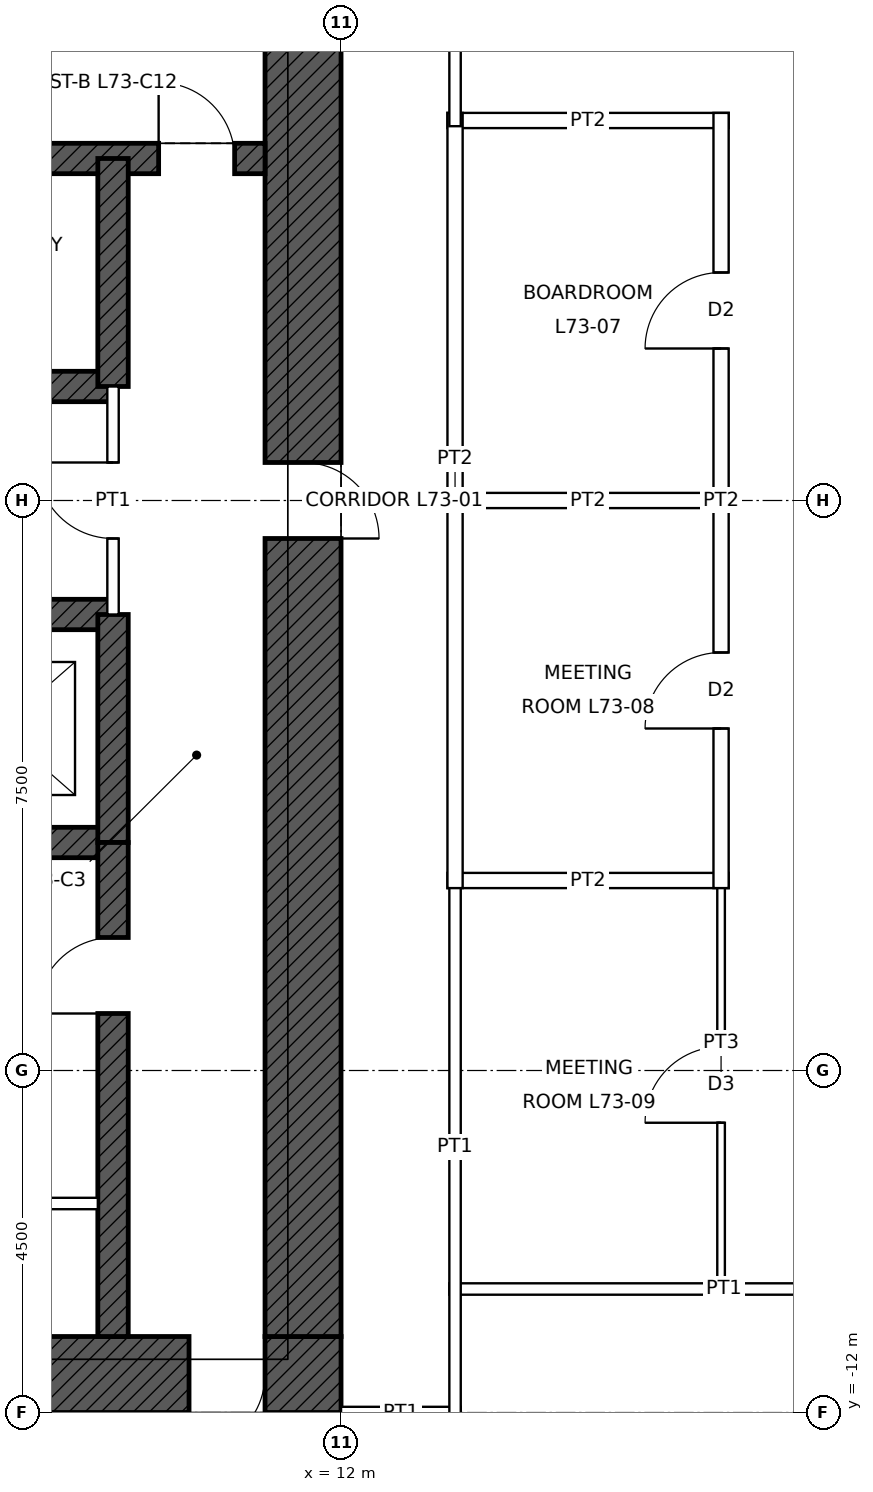
"""IFC4 building model, lengths in metres.
Left out: names, types, materials, properties, quantities, classifications, styles, units other than length and angle.
Written with IfcOpenShell. Run it as: python <this file> out.ifc"""

import sys

from ifc_helpers import new_model, si_unit, direction, frame, frame_2d, origin, place, context, subcontext, project, spatial, rectangle, extrude, element, fill, save


model = new_model("IFC4")
c1 = context("Model", 3, precision=1e-05, world=origin(), true_north=direction((0.0, 1.0)))
c2 = subcontext(c1, "Body", "Model", "MODEL_VIEW")
j1 = project(units=[si_unit("LENGTHUNIT", "METRE"), si_unit("PLANEANGLEUNIT", "RADIAN")], contexts=[c1])
p1 = place(None, origin())
s1 = spatial("IfcSite", under=j1, at=p1, CompositionType="ELEMENT")
p2 = place(p1, origin())
s2 = spatial("IfcBuilding", under=s1, at=p2, CompositionType="ELEMENT")
p3 = place(p2, frame((0.0, 0.0, 327.9)))
s3 = spatial("IfcBuildingStorey", under=s2, at=p3, CompositionType="ELEMENT", Elevation=327.9)
p4 = place(p3, frame((12.0, -11.5, 0.0), z_axis=(0.0, 0.0, 1.0), x_axis=(-1.0, 0.0, 0.0)))
e1 = element("IfcWall", 1, at=p4, inside=s3, PredefinedType="SHEAR", context=c2, shape_type="SweptSolid", body=[
    extrude(rectangle(XDim=24.0, YDim=1.0, at=frame_2d((12.0, 0.0))), origin(), (0.0, 0.0, 1.0), 4.0),
])
p5 = place(p4, frame((11.5, 0.0, 0.0)))
e2 = element("IfcOpeningElement", 2, at=p5, cuts=e1, PredefinedType="OPENING", context=c2, shape_type="SweptSolid", body=[
    extrude(rectangle(XDim=1.0, YDim=2.1, at=frame_2d((0.5, 1.05))), frame((0.0, 0.51, 0.0), z_axis=(0.0, -1.0, 0.0), x_axis=(1.0, 0.0, 0.0)), (0.0, 0.0, 1.0), 1.02),
])
p6 = place(p4, frame((1.0, 0.0, 0.0)))
e3 = element("IfcOpeningElement", 3, at=p6, cuts=e1, PredefinedType="OPENING", context=c2, shape_type="SweptSolid", body=[
    extrude(rectangle(XDim=1.0, YDim=2.4, at=frame_2d((0.5, 1.2))), frame((0.0, 0.51, 0.0), z_axis=(0.0, -1.0, 0.0), x_axis=(1.0, 0.0, 0.0)), (0.0, 0.0, 1.0), 1.02),
])
p7 = place(p3, frame((11.5, 11.0, 0.0), z_axis=(0.0, 0.0, 1.0), x_axis=(0.0, -1.0, 0.0)))
e4 = element("IfcWall", 4, at=p7, inside=s3, PredefinedType="SHEAR", context=c2, shape_type="SweptSolid", body=[
    extrude(rectangle(XDim=22.0, YDim=1.0, at=frame_2d((11.0, 0.0))), origin(), (0.0, 0.0, 1.0), 4.0),
])
p8 = place(p7, frame((10.5, 0.0, 0.0)))
e5 = element("IfcOpeningElement", 5, at=p8, cuts=e4, PredefinedType="OPENING", context=c2, shape_type="SweptSolid", body=[
    extrude(rectangle(XDim=1.0, YDim=2.4, at=frame_2d((0.5, 1.2))), frame((0.0, 0.51, 0.0), z_axis=(0.0, -1.0, 0.0), x_axis=(1.0, 0.0, 0.0)), (0.0, 0.0, 1.0), 1.02),
])
p9 = place(p3, frame((-11.0, 4.5, 0.0), z_axis=(0.0, 0.0, 1.0), x_axis=(1.0, 0.0, 0.0)))
e6 = element("IfcWall", 6, at=p9, inside=s3, PredefinedType="SHEAR", context=c2, shape_type="SweptSolid", body=[
    extrude(rectangle(XDim=22.0, YDim=0.4, at=frame_2d((11.0, 0.0))), origin(), (0.0, 0.0, 1.0), 4.0),
])
p10 = place(p9, frame((0.4, 0.0, 0.0)))
e7 = element("IfcOpeningElement", 7, at=p10, cuts=e6, PredefinedType="OPENING", context=c2, shape_type="SweptSolid", body=[
    extrude(rectangle(XDim=1.0, YDim=2.1, at=frame_2d((0.5, 1.05))), frame((0.0, 0.21, 0.0), z_axis=(0.0, -1.0, 0.0), x_axis=(1.0, 0.0, 0.0)), (0.0, 0.0, 1.0), 0.42),
])
p11 = place(p9, frame((20.6, 0.0, 0.0)))
e8 = element("IfcOpeningElement", 8, at=p11, cuts=e6, PredefinedType="OPENING", context=c2, shape_type="SweptSolid", body=[
    extrude(rectangle(XDim=1.0, YDim=2.1, at=frame_2d((0.5, 1.05))), frame((0.0, 0.21, 0.0), z_axis=(0.0, -1.0, 0.0), x_axis=(1.0, 0.0, 0.0)), (0.0, 0.0, 1.0), 0.42),
])
p12 = place(p3, frame((-9.0, 1.5, 0.0), z_axis=(0.0, 0.0, 1.0), x_axis=(1.0, 0.0, 0.0)))
e9 = element("IfcWall", 9, at=p12, inside=s3, PredefinedType="SHEAR", context=c2, shape_type="SweptSolid", body=[
    extrude(rectangle(XDim=18.0, YDim=0.4, at=frame_2d((9.0, 0.0))), origin(), (0.0, 0.0, 1.0), 4.0),
])
p13 = place(p12, frame((0.95, 0.0, 0.0)))
e10 = element("IfcOpeningElement", 10, at=p13, cuts=e9, PredefinedType="OPENING", context=c2, shape_type="SweptSolid", body=[
    extrude(rectangle(XDim=1.1, YDim=2.1, at=frame_2d((0.55, 1.05))), frame((0.0, 0.21, 0.0), z_axis=(0.0, -1.0, 0.0), x_axis=(1.0, 0.0, 0.0)), (0.0, 0.0, 1.0), 0.42),
])
p14 = place(p12, frame((3.95, 0.0, 0.0)))
e11 = element("IfcOpeningElement", 11, at=p14, cuts=e9, PredefinedType="OPENING", context=c2, shape_type="SweptSolid", body=[
    extrude(rectangle(XDim=1.1, YDim=2.1, at=frame_2d((0.55, 1.05))), frame((0.0, 0.21, 0.0), z_axis=(0.0, -1.0, 0.0), x_axis=(1.0, 0.0, 0.0)), (0.0, 0.0, 1.0), 0.42),
])
p15 = place(p12, frame((6.95, 0.0, 0.0)))
e12 = element("IfcOpeningElement", 12, at=p15, cuts=e9, PredefinedType="OPENING", context=c2, shape_type="SweptSolid", body=[
    extrude(rectangle(XDim=1.1, YDim=2.1, at=frame_2d((0.55, 1.05))), frame((0.0, 0.21, 0.0), z_axis=(0.0, -1.0, 0.0), x_axis=(1.0, 0.0, 0.0)), (0.0, 0.0, 1.0), 0.42),
])
p16 = place(p12, frame((9.95, 0.0, 0.0)))
e13 = element("IfcOpeningElement", 13, at=p16, cuts=e9, PredefinedType="OPENING", context=c2, shape_type="SweptSolid", body=[
    extrude(rectangle(XDim=1.1, YDim=2.1, at=frame_2d((0.55, 1.05))), frame((0.0, 0.21, 0.0), z_axis=(0.0, -1.0, 0.0), x_axis=(1.0, 0.0, 0.0)), (0.0, 0.0, 1.0), 0.42),
])
p17 = place(p12, frame((12.95, 0.0, 0.0)))
e14 = element("IfcOpeningElement", 14, at=p17, cuts=e9, PredefinedType="OPENING", context=c2, shape_type="SweptSolid", body=[
    extrude(rectangle(XDim=1.1, YDim=2.1, at=frame_2d((0.55, 1.05))), frame((0.0, 0.21, 0.0), z_axis=(0.0, -1.0, 0.0), x_axis=(1.0, 0.0, 0.0)), (0.0, 0.0, 1.0), 0.42),
])
p18 = place(p12, frame((15.95, 0.0, 0.0)))
e15 = element("IfcOpeningElement", 15, at=p18, cuts=e9, PredefinedType="OPENING", context=c2, shape_type="SweptSolid", body=[
    extrude(rectangle(XDim=1.1, YDim=2.1, at=frame_2d((0.55, 1.05))), frame((0.0, 0.21, 0.0), z_axis=(0.0, -1.0, 0.0), x_axis=(1.0, 0.0, 0.0)), (0.0, 0.0, 1.0), 0.42),
])
p19 = place(p3, frame((-9.0, -1.5, 0.0), z_axis=(0.0, 0.0, 1.0), x_axis=(1.0, 0.0, 0.0)))
e16 = element("IfcWall", 16, at=p19, inside=s3, PredefinedType="SHEAR", context=c2, shape_type="SweptSolid", body=[
    extrude(rectangle(XDim=18.0, YDim=0.4, at=frame_2d((9.0, 0.0))), origin(), (0.0, 0.0, 1.0), 4.0),
])
p20 = place(p19, frame((9.95, 0.0, 0.0)))
e17 = element("IfcOpeningElement", 17, at=p20, cuts=e16, PredefinedType="OPENING", context=c2, shape_type="SweptSolid", body=[
    extrude(rectangle(XDim=1.1, YDim=2.1, at=frame_2d((0.55, 1.05))), frame((0.0, 0.21, 0.0), z_axis=(0.0, -1.0, 0.0), x_axis=(1.0, 0.0, 0.0)), (0.0, 0.0, 1.0), 0.42),
])
p21 = place(p19, frame((12.95, 0.0, 0.0)))
e18 = element("IfcOpeningElement", 18, at=p21, cuts=e16, PredefinedType="OPENING", context=c2, shape_type="SweptSolid", body=[
    extrude(rectangle(XDim=1.1, YDim=2.1, at=frame_2d((0.55, 1.05))), frame((0.0, 0.21, 0.0), z_axis=(0.0, -1.0, 0.0), x_axis=(1.0, 0.0, 0.0)), (0.0, 0.0, 1.0), 0.42),
])
p22 = place(p19, frame((15.95, 0.0, 0.0)))
e19 = element("IfcOpeningElement", 19, at=p22, cuts=e16, PredefinedType="OPENING", context=c2, shape_type="SweptSolid", body=[
    extrude(rectangle(XDim=1.1, YDim=2.1, at=frame_2d((0.55, 1.05))), frame((0.0, 0.21, 0.0), z_axis=(0.0, -1.0, 0.0), x_axis=(1.0, 0.0, 0.0)), (0.0, 0.0, 1.0), 0.42),
])
p23 = place(p19, frame((0.95, 0.0, 0.0)))
e20 = element("IfcOpeningElement", 20, at=p23, cuts=e16, PredefinedType="OPENING", context=c2, shape_type="SweptSolid", body=[
    extrude(rectangle(XDim=1.1, YDim=2.1, at=frame_2d((0.55, 1.05))), frame((0.0, 0.21, 0.0), z_axis=(0.0, -1.0, 0.0), x_axis=(1.0, 0.0, 0.0)), (0.0, 0.0, 1.0), 0.42),
])
p24 = place(p19, frame((3.95, 0.0, 0.0)))
e21 = element("IfcOpeningElement", 21, at=p24, cuts=e16, PredefinedType="OPENING", context=c2, shape_type="SweptSolid", body=[
    extrude(rectangle(XDim=1.1, YDim=2.1, at=frame_2d((0.55, 1.05))), frame((0.0, 0.21, 0.0), z_axis=(0.0, -1.0, 0.0), x_axis=(1.0, 0.0, 0.0)), (0.0, 0.0, 1.0), 0.42),
])
p25 = place(p19, frame((6.95, 0.0, 0.0)))
e22 = element("IfcOpeningElement", 22, at=p25, cuts=e16, PredefinedType="OPENING", context=c2, shape_type="SweptSolid", body=[
    extrude(rectangle(XDim=1.1, YDim=2.1, at=frame_2d((0.55, 1.05))), frame((0.0, 0.21, 0.0), z_axis=(0.0, -1.0, 0.0), x_axis=(1.0, 0.0, 0.0)), (0.0, 0.0, 1.0), 0.42),
])
p26 = place(p3, frame((-9.0, -4.5, 0.0), z_axis=(0.0, 0.0, 1.0), x_axis=(1.0, 0.0, 0.0)))
e23 = element("IfcWall", 23, at=p26, inside=s3, PredefinedType="SHEAR", context=c2, shape_type="SweptSolid", body=[
    extrude(rectangle(XDim=18.0, YDim=0.4, at=frame_2d((9.0, 0.0))), origin(), (0.0, 0.0, 1.0), 4.0),
])
for number, where, z_axis, x_axis in (
    (24, (9.0, 1.5, 0.0), (0.0, 0.0, 1.0), (0.0, 1.0, 0.0)),
    (25, (9.0, -4.5, 0.0), (0.0, 0.0, 1.0), (0.0, 1.0, 0.0)),
):
    element("IfcWall", number, at=place(p3, frame(where, z_axis=z_axis, x_axis=x_axis)), inside=s3, PredefinedType="SHEAR", context=c2, shape_type="SweptSolid", body=[
        extrude(rectangle(XDim=3.0, YDim=0.4, at=frame_2d((1.5, 0.0))), origin(), (0.0, 0.0, 1.0), 4.0),
    ])
p27 = place(p3, frame((9.0, -11.0, 0.0), z_axis=(0.0, 0.0, 1.0), x_axis=(0.0, 1.0, 0.0)))
e26 = element("IfcWall", 26, at=p27, inside=s3, PredefinedType="SHEAR", context=c2, shape_type="SweptSolid", body=[
    extrude(rectangle(XDim=6.5, YDim=0.4, at=frame_2d((3.25, 0.0))), origin(), (0.0, 0.0, 1.0), 4.0),
])
p28 = place(p27, frame((4.25, 0.0, 0.0)))
e27 = element("IfcOpeningElement", 27, at=p28, cuts=e26, PredefinedType="OPENING", context=c2, shape_type="SweptSolid", body=[
    extrude(rectangle(XDim=1.0, YDim=2.1, at=frame_2d((0.5, 1.05))), frame((0.0, 0.21, 0.0), z_axis=(0.0, -1.0, 0.0), x_axis=(1.0, 0.0, 0.0)), (0.0, 0.0, 1.0), 0.42),
])
p29 = place(p3, frame((12.0, -12.0, 0.0), z_axis=(0.0, 0.0, 1.0), x_axis=(1.0, 0.0, 0.0)))
e28 = element("IfcWall", 28, at=p29, inside=s3, PredefinedType="PARTITIONING", context=c2, shape_type="SweptSolid", body=[
    extrude(rectangle(XDim=1.575, YDim=0.15, at=frame_2d((0.788, 0.0))), origin(), (0.0, 0.0, 1.0), 3.85),
])
p30 = place(p3, frame((13.425, -10.375, 0.0), z_axis=(0.0, 0.0, 1.0), x_axis=(1.0, 0.0, 0.0)))
e29 = element("IfcWall", 29, at=p30, inside=s3, PredefinedType="PARTITIONING", context=c2, shape_type="SweptSolid", body=[
    extrude(rectangle(XDim=7.225, YDim=0.15, at=frame_2d((3.612, 0.0))), origin(), (0.0, 0.0, 1.0), 3.85),
])
p31 = place(p3, frame((13.4, -5.0, 0.0), z_axis=(0.0, 0.0, 1.0), x_axis=(1.0, 0.0, 0.0)))
e30 = element("IfcWall", 30, at=p31, inside=s3, PredefinedType="PARTITIONING", context=c2, shape_type="SweptSolid", body=[
    extrude(rectangle(XDim=3.7, YDim=0.2, at=frame_2d((1.85, 0.0))), origin(), (0.0, 0.0, 1.0), 3.85),
])
p32 = place(p3, frame((13.4, 0.0, 0.0), z_axis=(0.0, 0.0, 1.0), x_axis=(1.0, 0.0, 0.0)))
e31 = element("IfcWall", 31, at=p32, inside=s3, PredefinedType="PARTITIONING", context=c2, shape_type="SweptSolid", body=[
    extrude(rectangle(XDim=3.7, YDim=0.2, at=frame_2d((1.85, 0.0))), origin(), (0.0, 0.0, 1.0), 3.243),
])
p33 = place(p3, frame((13.4, 5.0, 0.0), z_axis=(0.0, 0.0, 1.0), x_axis=(1.0, 0.0, 0.0)))
e32 = element("IfcWall", 32, at=p33, inside=s3, PredefinedType="PARTITIONING", context=c2, shape_type="SweptSolid", body=[
    extrude(rectangle(XDim=3.7, YDim=0.2, at=frame_2d((1.85, 0.0))), origin(), (0.0, 0.0, 1.0), 3.85),
])
p34 = place(p3, frame((13.5, -12.075, 0.0), z_axis=(0.0, 0.0, 1.0), x_axis=(0.0, 1.0, 0.0)))
e33 = element("IfcWall", 33, at=p34, inside=s3, PredefinedType="PARTITIONING", context=c2, shape_type="SweptSolid", body=[
    extrude(rectangle(XDim=7.15, YDim=0.15, at=frame_2d((3.575, 0.0))), origin(), (0.0, 0.0, 1.0), 3.85),
])
p35 = place(p3, frame((13.5, -5.1, 0.0), z_axis=(0.0, 0.0, 1.0), x_axis=(0.0, 1.0, 0.0)))
e34 = element("IfcWall", 34, at=p35, inside=s3, PredefinedType="PARTITIONING", context=c2, shape_type="SweptSolid", body=[
    extrude(rectangle(XDim=10.2, YDim=0.2, at=frame_2d((5.1, 0.0))), origin(), (0.0, 0.0, 1.0), 3.85),
])
p36 = place(p3, frame((13.5, 4.925, 0.0), z_axis=(0.0, 0.0, 1.0), x_axis=(0.0, 1.0, 0.0)))
e35 = element("IfcWall", 35, at=p36, inside=s3, PredefinedType="PARTITIONING", context=c2, shape_type="SweptSolid", body=[
    extrude(rectangle(XDim=8.65, YDim=0.15, at=frame_2d((4.325, 0.0))), origin(), (0.0, 0.0, 1.0), 3.85),
])
p37 = place(p36, frame((3.825, 0.0, 0.0)))
e36 = element("IfcOpeningElement", 36, at=p37, cuts=e35, PredefinedType="OPENING", context=c2, shape_type="SweptSolid", body=[
    extrude(rectangle(XDim=1.0, YDim=2.4, at=frame_2d((0.5, 1.2))), frame((0.0, 0.085, 0.0), z_axis=(0.0, -1.0, 0.0), x_axis=(1.0, 0.0, 0.0)), (0.0, 0.0, 1.0), 0.17),
])
p38 = place(p3, frame((17.0, -10.425, 0.0), z_axis=(0.0, 0.0, 1.0), x_axis=(0.0, 1.0, 0.0)))
e37 = element("IfcWall", 37, at=p38, inside=s3, PredefinedType="PARTITIONING", context=c2, shape_type="SweptSolid", body=[
    extrude(rectangle(XDim=5.475, YDim=0.1, at=frame_2d((2.738, 0.0))), origin(), (0.0, 0.0, 1.0), 3.85),
])
p39 = place(p38, frame((2.238, 0.0, 0.0)))
e38 = element("IfcOpeningElement", 38, at=p39, cuts=e37, PredefinedType="OPENING", context=c2, shape_type="SweptSolid", body=[
    extrude(rectangle(XDim=1.0, YDim=2.1, at=frame_2d((0.5, 1.05))), frame((0.0, 0.06, 0.0), z_axis=(0.0, -1.0, 0.0), x_axis=(1.0, 0.0, 0.0)), (0.0, 0.0, 1.0), 0.12),
])
p40 = place(p3, frame((17.0, -5.1, 0.0), z_axis=(0.0, 0.0, 1.0), x_axis=(0.0, 1.0, 0.0)))
e39 = element("IfcWall", 39, at=p40, inside=s3, PredefinedType="PARTITIONING", context=c2, shape_type="SweptSolid", body=[
    extrude(rectangle(XDim=10.2, YDim=0.2, at=frame_2d((5.1, 0.0))), origin(), (0.0, 0.0, 1.0), 3.85),
])
p41 = place(p40, frame((7.1, 0.0, 0.0)))
e40 = element("IfcOpeningElement", 40, at=p41, cuts=e39, PredefinedType="OPENING", context=c2, shape_type="SweptSolid", body=[
    extrude(rectangle(XDim=1.0, YDim=2.1, at=frame_2d((0.5, 1.05))), frame((0.0, 0.11, 0.0), z_axis=(0.0, -1.0, 0.0), x_axis=(1.0, 0.0, 0.0)), (0.0, 0.0, 1.0), 0.22),
])
p42 = place(p40, frame((2.1, 0.0, 0.0)))
e41 = element("IfcOpeningElement", 41, at=p42, cuts=e39, PredefinedType="OPENING", context=c2, shape_type="SweptSolid", body=[
    extrude(rectangle(XDim=1.0, YDim=2.1, at=frame_2d((0.5, 1.05))), frame((0.0, 0.11, 0.0), z_axis=(0.0, -1.0, 0.0), x_axis=(1.0, 0.0, 0.0)), (0.0, 0.0, 1.0), 0.22),
])
p43 = place(p3, frame((3.2, -9.25, 0.0), z_axis=(0.0, 0.0, 1.0), x_axis=(1.0, 0.0, 0.0)))
e42 = element("IfcWall", 42, at=p43, inside=s3, PredefinedType="PARTITIONING", context=c2, shape_type="SweptSolid", body=[
    extrude(rectangle(XDim=5.6, YDim=0.15, at=frame_2d((2.8, 0.0))), origin(), (0.0, 0.0, 1.0), 3.75),
])
p44 = place(p43, frame((2.3, 0.0, 0.0)))
e43 = element("IfcOpeningElement", 43, at=p44, cuts=e42, PredefinedType="OPENING", context=c2, shape_type="SweptSolid", body=[
    extrude(rectangle(XDim=1.0, YDim=2.1, at=frame_2d((0.5, 1.05))), frame((0.0, 0.085, 0.0), z_axis=(0.0, -1.0, 0.0), x_axis=(1.0, 0.0, 0.0)), (0.0, 0.0, 1.0), 0.17),
])
p45 = place(p3, frame((9.0, -1.5, 0.0), z_axis=(0.0, 0.0, 1.0), x_axis=(0.0, 1.0, 0.0)))
e44 = element("IfcWall", 44, at=p45, inside=s3, PredefinedType="PARTITIONING", context=c2, shape_type="SweptSolid", body=[
    extrude(rectangle(XDim=3.0, YDim=0.15, at=frame_2d((1.5, 0.0))), origin(), (0.0, 0.0, 1.0), 3.75),
])
p46 = place(p45, frame((1.0, 0.0, 0.0)))
e45 = element("IfcOpeningElement", 45, at=p46, cuts=e44, PredefinedType="OPENING", context=c2, shape_type="SweptSolid", body=[
    extrude(rectangle(XDim=1.0, YDim=2.4, at=frame_2d((0.5, 1.2))), frame((0.0, 0.085, 0.0), z_axis=(0.0, -1.0, 0.0), x_axis=(1.0, 0.0, 0.0)), (0.0, 0.0, 1.0), 0.17),
])
p47 = place(p11, origin())
e46 = element("IfcDoor", 46, at=p47, inside=s3, OperationType="SINGLE_SWING_LEFT", PredefinedType="DOOR", context=c2, shape_type="SweptSolid", body=[
    extrude(rectangle(XDim=1.0, YDim=2.1, at=frame_2d((0.5, 1.05))), frame((0.0, 0.025, 0.0), z_axis=(0.0, -1.0, 0.0), x_axis=(1.0, 0.0, 0.0)), (0.0, 0.0, 1.0), 0.05),
])
fill(e8, e46)
p48 = place(p8, origin())
e47 = element("IfcDoor", 47, at=p48, inside=s3, OperationType="SINGLE_SWING_RIGHT", PredefinedType="DOOR", context=c2, shape_type="SweptSolid", body=[
    extrude(rectangle(XDim=1.0, YDim=2.4, at=frame_2d((0.5, 1.2))), frame((0.0, 0.485, 0.0), z_axis=(0.0, -1.0, 0.0), x_axis=(1.0, 0.0, 0.0)), (0.0, 0.0, 1.0), 0.05),
])
fill(e5, e47)
p49 = place(p6, origin())
e48 = element("IfcDoor", 48, at=p49, inside=s3, OperationType="SINGLE_SWING_RIGHT", PredefinedType="DOOR", context=c2, shape_type="SweptSolid", body=[
    extrude(rectangle(XDim=1.0, YDim=2.4, at=frame_2d((0.5, 1.2))), frame((0.0, 0.485, 0.0), z_axis=(0.0, -1.0, 0.0), x_axis=(1.0, 0.0, 0.0)), (0.0, 0.0, 1.0), 0.05),
])
fill(e3, e48)
p50 = place(p28, origin())
e49 = element("IfcDoor", 49, at=p50, inside=s3, OperationType="SINGLE_SWING_LEFT", PredefinedType="DOOR", context=c2, shape_type="SweptSolid", body=[
    extrude(rectangle(XDim=1.0, YDim=2.1, at=frame_2d((0.5, 1.05))), frame((0.0, 0.025, 0.0), z_axis=(0.0, -1.0, 0.0), x_axis=(1.0, 0.0, 0.0)), (0.0, 0.0, 1.0), 0.05),
])
fill(e27, e49)
p51 = place(p46, origin())
e50 = element("IfcDoor", 50, at=p51, inside=s3, OperationType="SINGLE_SWING_RIGHT", PredefinedType="DOOR", context=c2, shape_type="SweptSolid", body=[
    extrude(rectangle(XDim=1.0, YDim=2.4, at=frame_2d((0.5, 1.2))), frame((0.0, 0.025, 0.0), z_axis=(0.0, -1.0, 0.0), x_axis=(1.0, 0.0, 0.0)), (0.0, 0.0, 1.0), 0.05),
])
fill(e45, e50)
p52 = place(p41, origin())
e51 = element("IfcDoor", 51, at=p52, inside=s3, OperationType="SINGLE_SWING_LEFT", PredefinedType="DOOR", context=c2, shape_type="SweptSolid", body=[
    extrude(rectangle(XDim=1.0, YDim=2.1, at=frame_2d((0.5, 1.05))), frame((0.0, 0.025, 0.0), z_axis=(0.0, -1.0, 0.0), x_axis=(1.0, 0.0, 0.0)), (0.0, 0.0, 1.0), 0.05),
])
fill(e40, e51)
p53 = place(p42, origin())
e52 = element("IfcDoor", 52, at=p53, inside=s3, OperationType="SINGLE_SWING_LEFT", PredefinedType="DOOR", context=c2, shape_type="SweptSolid", body=[
    extrude(rectangle(XDim=1.0, YDim=2.1, at=frame_2d((0.5, 1.05))), frame((0.0, 0.025, 0.0), z_axis=(0.0, -1.0, 0.0), x_axis=(1.0, 0.0, 0.0)), (0.0, 0.0, 1.0), 0.05),
])
fill(e41, e52)
p54 = place(p39, origin())
e53 = element("IfcDoor", 53, at=p54, inside=s3, OperationType="SINGLE_SWING_LEFT", PredefinedType="DOOR", context=c2, shape_type="SweptSolid", body=[
    extrude(rectangle(XDim=1.0, YDim=2.1, at=frame_2d((0.5, 1.05))), frame((0.0, 0.025, 0.0), z_axis=(0.0, -1.0, 0.0), x_axis=(1.0, 0.0, 0.0)), (0.0, 0.0, 1.0), 0.05),
])
fill(e38, e53)
save(model, sys.argv[1])
